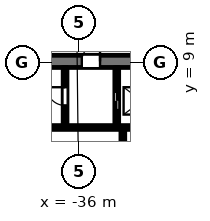
"""IFC4 building model, lengths in metres.
Left out: names, types, materials, properties, quantities, classifications, styles, units other than length and angle.
Written with IfcOpenShell. Run it as: python <this file> out.ifc"""

import sys

from ifc_helpers import new_model, si_unit, direction, frame, frame_2d, origin, place, context, subcontext, project, spatial, rectangle, extrude, element, fill, save


model = new_model("IFC4")
c1 = context("Model", 3, precision=1e-05, world=origin(), true_north=direction((0.0, 1.0)))
c2 = subcontext(c1, "Body", "Model", "MODEL_VIEW")
j1 = project(units=[si_unit("LENGTHUNIT", "METRE"), si_unit("PLANEANGLEUNIT", "RADIAN")], contexts=[c1])
p1 = place(None, origin())
s1 = spatial("IfcSite", under=j1, at=p1, CompositionType="ELEMENT")
p2 = place(p1, origin())
s2 = spatial("IfcBuilding", under=s1, at=p2, CompositionType="ELEMENT")
p3 = place(p2, frame((0.0, 0.0, -4.5)))
s3 = spatial("IfcBuildingStorey", under=s2, at=p3, CompositionType="ELEMENT", Elevation=-4.5)
p4 = place(p3, frame((-44.7, 4.75, 0.0), z_axis=(0.0, 0.0, 1.0), x_axis=(1.0, 0.0, 0.0)))
e1 = element("IfcWall", 1, at=p4, inside=s3, PredefinedType="SHEAR", context=c2, shape_type="SweptSolid", body=[
    extrude(rectangle(XDim=17.4, YDim=0.25, at=frame_2d((8.7, 0.0))), origin(), (0.0, 0.0, 1.0), 4.2),
])
p5 = place(p3, frame((-44.7, 9.1, 0.0), z_axis=(0.0, 0.0, 1.0), x_axis=(1.0, 0.0, 0.0)))
e2 = element("IfcWall", 2, at=p5, inside=s3, PredefinedType="SHEAR", context=c2, shape_type="SweptSolid", body=[
    extrude(rectangle(XDim=17.4, YDim=0.8, at=frame_2d((8.7, 0.0))), origin(), (0.0, 0.0, 1.0), 4.2),
])
p6 = place(p5, frame((8.9, 0.0, 0.0)))
e3 = element("IfcOpeningElement", 3, at=p6, cuts=e2, PredefinedType="OPENING", context=c2, shape_type="SweptSolid", body=[
    extrude(rectangle(XDim=1.2, YDim=2.1, at=frame_2d((0.6, 1.05))), frame((0.0, 0.41, 0.0), z_axis=(0.0, -1.0, 0.0), x_axis=(1.0, 0.0, 0.0)), (0.0, 0.0, 1.0), 0.82),
])
p7 = place(p5, frame((14.85, 0.0, 0.0)))
e4 = element("IfcOpeningElement", 4, at=p7, cuts=e2, PredefinedType="OPENING", context=c2, shape_type="SweptSolid", body=[
    extrude(rectangle(XDim=0.9, YDim=2.1, at=frame_2d((0.45, 1.05))), frame((0.0, 0.41, 0.0), z_axis=(0.0, -1.0, 0.0), x_axis=(1.0, 0.0, 0.0)), (0.0, 0.0, 1.0), 0.82),
])
p8 = place(p5, frame((16.35, 0.0, 0.0)))
e5 = element("IfcOpeningElement", 5, at=p8, cuts=e2, PredefinedType="OPENING", context=c2, shape_type="SweptSolid", body=[
    extrude(rectangle(XDim=0.9, YDim=2.1, at=frame_2d((0.45, 1.05))), frame((0.0, 0.41, 0.0), z_axis=(0.0, -1.0, 0.0), x_axis=(1.0, 0.0, 0.0)), (0.0, 0.0, 1.0), 0.82),
])
p9 = place(p3, frame((-36.9, 4.875, 0.0), z_axis=(0.0, 0.0, 1.0), x_axis=(0.0, 1.0, 0.0)))
e6 = element("IfcWall", 6, at=p9, inside=s3, PredefinedType="SHEAR", context=c2, shape_type="SweptSolid", body=[
    extrude(rectangle(XDim=3.825, YDim=0.25, at=frame_2d((1.913, 0.0))), origin(), (0.0, 0.0, 1.0), 4.2),
])
p10 = place(p9, frame((1.325, 0.0, 0.0)))
e7 = element("IfcOpeningElement", 7, at=p10, cuts=e6, PredefinedType="OPENING", context=c2, shape_type="SweptSolid", body=[
    extrude(rectangle(XDim=1.2, YDim=2.1, at=frame_2d((0.6, 1.05))), frame((0.0, 0.135, 0.0), z_axis=(0.0, -1.0, 0.0), x_axis=(1.0, 0.0, 0.0)), (0.0, 0.0, 1.0), 0.27),
])
p11 = place(p3, frame((-33.5, 4.875, 0.0), z_axis=(0.0, 0.0, 1.0), x_axis=(0.0, 1.0, 0.0)))
e8 = element("IfcWall", 8, at=p11, inside=s3, PredefinedType="SHEAR", context=c2, shape_type="SweptSolid", body=[
    extrude(rectangle(XDim=3.825, YDim=0.25, at=frame_2d((1.913, 0.0))), origin(), (0.0, 0.0, 1.0), 4.2),
])
p12 = place(p11, frame((1.025, 0.0, 0.0)))
e9 = element("IfcOpeningElement", 9, at=p12, cuts=e8, PredefinedType="OPENING", context=c2, shape_type="SweptSolid", body=[
    extrude(rectangle(XDim=1.2, YDim=2.1, at=frame_2d((0.6, 1.05))), frame((0.0, 0.135, 0.0), z_axis=(0.0, -1.0, 0.0), x_axis=(1.0, 0.0, 0.0)), (0.0, 0.0, 1.0), 0.27),
])
p13 = place(p3, frame((-33.1, 2.0, 0.0), z_axis=(0.0, 0.0, 1.0), x_axis=(0.0, 1.0, 0.0)))
e10 = element("IfcWall", 10, at=p13, inside=s3, PredefinedType="SHEAR", context=c2, shape_type="SweptSolid", body=[
    extrude(rectangle(XDim=2.625, YDim=0.25, at=frame_2d((1.312, 0.0))), origin(), (0.0, 0.0, 1.0), 4.2),
])
p14 = place(p12, origin())
e11 = element("IfcDoor", 11, at=p14, inside=s3, OperationType="SLIDING_TO_LEFT", PredefinedType="DOOR", context=c2, shape_type="SweptSolid", body=[
    extrude(rectangle(XDim=1.2, YDim=2.1, at=frame_2d((0.6, 1.05))), frame((0.0, 0.025, 0.0), z_axis=(0.0, -1.0, 0.0), x_axis=(1.0, 0.0, 0.0)), (0.0, 0.0, 1.0), 0.05),
])
fill(e9, e11)
p15 = place(p10, origin())
e12 = element("IfcDoor", 12, at=p15, inside=s3, OperationType="SINGLE_SWING_RIGHT", PredefinedType="DOOR", context=c2, shape_type="SweptSolid", body=[
    extrude(rectangle(XDim=1.2, YDim=2.1, at=frame_2d((0.6, 1.05))), frame((0.0, 0.025, 0.0), z_axis=(0.0, -1.0, 0.0), x_axis=(1.0, 0.0, 0.0)), (0.0, 0.0, 1.0), 0.05),
])
fill(e7, e12)
p16 = place(p6, origin())
e13 = element("IfcDoor", 13, at=p16, inside=s3, OperationType="SINGLE_SWING_RIGHT", PredefinedType="DOOR", context=c2, shape_type="SweptSolid", body=[
    extrude(rectangle(XDim=1.2, YDim=2.1, at=frame_2d((0.6, 1.05))), frame((0.0, -0.225, 0.0), z_axis=(0.0, -1.0, 0.0), x_axis=(1.0, 0.0, 0.0)), (0.0, 0.0, 1.0), 0.05),
])
fill(e3, e13)
save(model, sys.argv[1])
